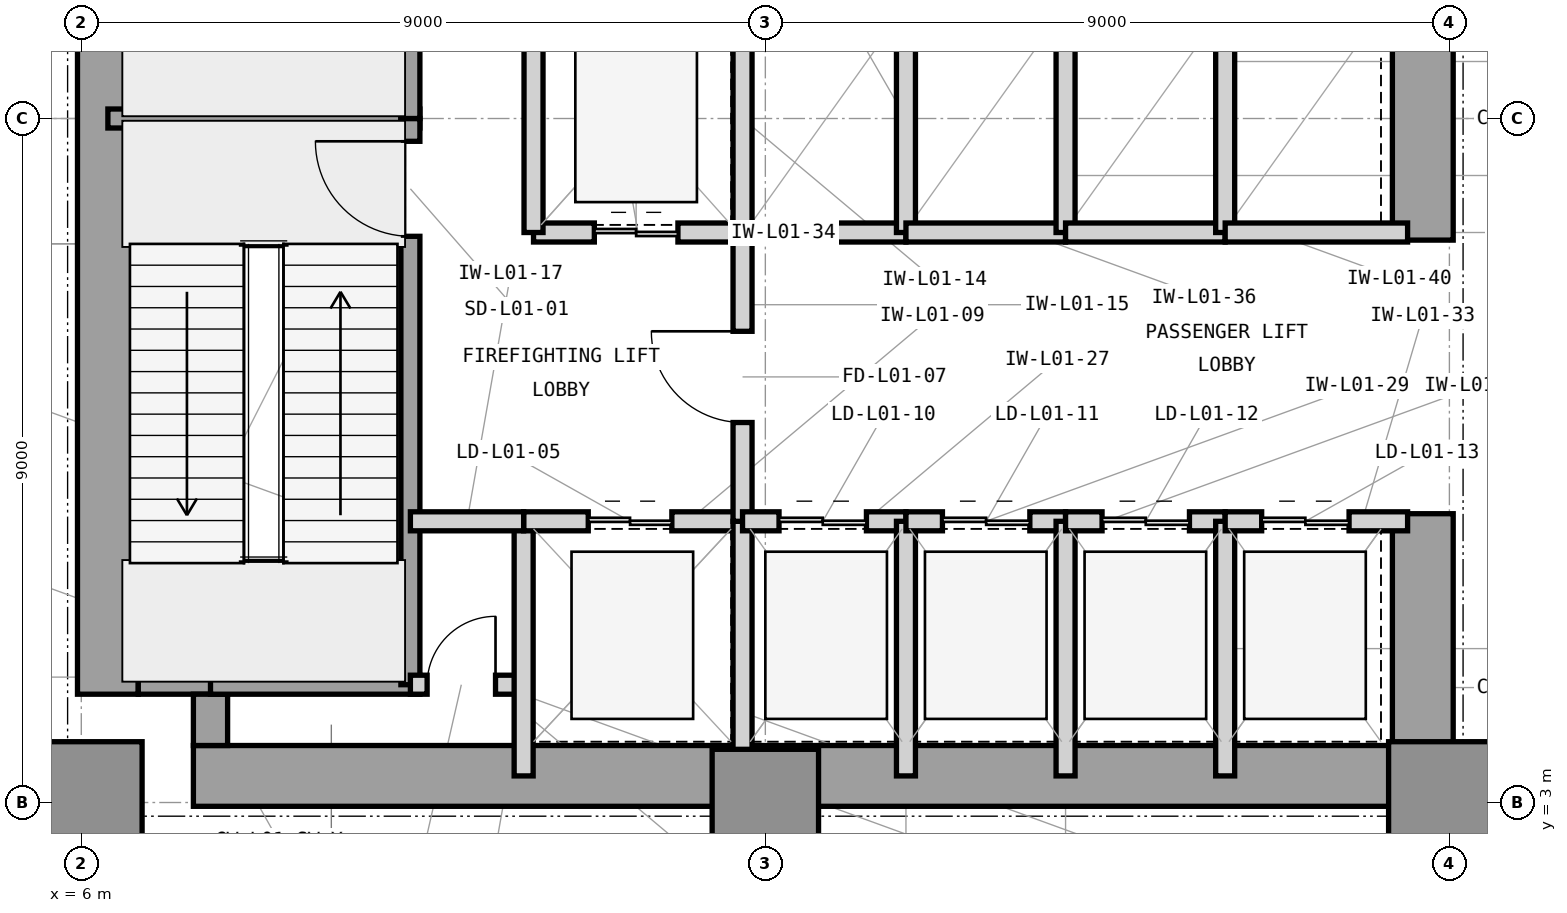
"""IFC4 building model, lengths in metres.
Left out: names, types, materials, properties, quantities, classifications, styles, units other than length and angle.
Written with IfcOpenShell. Run it as: python <this file> out.ifc"""

import sys

from ifc_helpers import new_model, si_unit, direction, frame, frame_2d, origin, origin_2d, place, context, subcontext, project, spatial, rectangle, extrude, element, fill, save


model = new_model("IFC4")
c1 = context("Model", 3, precision=1e-05, world=origin(), true_north=direction((0.0, 1.0)))
c2 = subcontext(c1, "Body", "Model", "MODEL_VIEW")
j1 = project(units=[si_unit("LENGTHUNIT", "METRE"), si_unit("PLANEANGLEUNIT", "RADIAN")], contexts=[c1])
p1 = place(None, origin())
s1 = spatial("IfcSite", under=j1, at=p1, CompositionType="ELEMENT")
p2 = place(p1, origin())
s2 = spatial("IfcBuilding", under=s1, at=p2, CompositionType="ELEMENT")
p3 = place(p2, frame((0.0, 0.0, 5.4)))
s3 = spatial("IfcBuildingStorey", under=s2, at=p3, CompositionType="ELEMENT", Elevation=5.4)
p4 = place(p3, frame((7.475, 3.35, 0.0), z_axis=(0.0, 0.0, 1.0), x_axis=(1.0, 0.0, 0.0)))
e1 = element("IfcWall", 1, at=p4, inside=s3, PredefinedType="SHEAR", context=c2, shape_type="SweptSolid", body=[
    extrude(rectangle(XDim=16.575, YDim=0.8, at=frame_2d((8.288, 0.0))), origin(), (0.0, 0.0, 1.0), 5.4),
])
p5 = place(p3, frame((6.35, 4.425, 0.0), z_axis=(0.0, 0.0, 1.0), x_axis=(0.0, 1.0, 0.0)))
e2 = element("IfcWall", 2, at=p5, inside=s3, PredefinedType="SHEAR", context=c2, shape_type="SweptSolid", body=[
    extrude(rectangle(XDim=15.15, YDim=0.8, at=frame_2d((7.575, 0.0))), origin(), (0.0, 0.0, 1.0), 5.4),
])
p6 = place(p3, frame((23.65, 3.75, 0.0), z_axis=(0.0, 0.0, 1.0), x_axis=(0.0, 1.0, 0.0)))
e3 = element("IfcWall", 3, at=p6, inside=s3, PredefinedType="SHEAR", context=c2, shape_type="SweptSolid", body=[
    extrude(rectangle(XDim=3.05, YDim=0.8, at=frame_2d((1.525, 0.0))), origin(), (0.0, 0.0, 1.0), 5.4),
])
p7 = place(p3, frame((23.65, 10.4, 0.0), z_axis=(0.0, 0.0, 1.0), x_axis=(0.0, 1.0, 0.0)))
e4 = element("IfcWall", 4, at=p7, inside=s3, PredefinedType="SHEAR", context=c2, shape_type="SweptSolid", body=[
    extrude(rectangle(XDim=3.2, YDim=0.8, at=frame_2d((1.6, 0.0))), origin(), (0.0, 0.0, 1.0), 5.4),
])
p8 = place(p3, frame((6.75, 4.65, 0.0), z_axis=(0.0, 0.0, 1.0), x_axis=(1.0, 0.0, 0.0)))
e5 = element("IfcWall", 5, at=p8, inside=s3, PredefinedType="SHEAR", context=c2, shape_type="SweptSolid", body=[
    extrude(rectangle(XDim=1.175, YDim=0.45, at=frame_2d((0.587, 0.0))), origin(), (0.0, 0.0, 1.0), 5.4),
])
p9 = place(p3, frame((7.7, 3.75, 0.0), z_axis=(0.0, 0.0, 1.0), x_axis=(0.0, 1.0, 0.0)))
e6 = element("IfcWall", 6, at=p9, inside=s3, PredefinedType="SHEAR", context=c2, shape_type="SweptSolid", body=[
    extrude(rectangle(XDim=0.675, YDim=0.45, at=frame_2d((0.337, 0.0))), origin(), (0.0, 0.0, 1.0), 5.4),
])
p10 = place(p3, frame((6.0, 3.0, 0.0), z_axis=(0.0, 0.0, 1.0), x_axis=(1.0, 0.0, 0.0)))
e7 = element("IfcColumn", 7, at=p10, inside=s3, PredefinedType="COLUMN", context=c2, shape_type="SweptSolid", body=[
    extrude(rectangle(XDim=1.6, YDim=1.6, at=origin_2d()), origin(), (0.0, 0.0, 1.0), 5.4),
])
p11 = place(p3, frame((15.0, 3.0, 0.0), z_axis=(0.0, 0.0, 1.0), x_axis=(1.0, 0.0, 0.0)))
e8 = element("IfcColumn", 8, at=p11, inside=s3, PredefinedType="COLUMN", context=c2, shape_type="SweptSolid", body=[
    extrude(rectangle(XDim=1.4, YDim=1.4, at=origin_2d()), origin(), (0.0, 0.0, 1.0), 5.4),
])
p12 = place(p3, frame((24.0, 3.0, 0.0), z_axis=(0.0, 0.0, 1.0), x_axis=(1.0, 0.0, 0.0)))
e9 = element("IfcColumn", 9, at=p12, inside=s3, PredefinedType="COLUMN", context=c2, shape_type="SweptSolid", body=[
    extrude(rectangle(XDim=1.6, YDim=1.6, at=origin_2d()), origin(), (0.0, 0.0, 1.0), 5.4),
])
p13 = place(p3, frame((6.35, 12.0, 0.0), z_axis=(0.0, 0.0, 1.0), x_axis=(1.0, 0.0, 0.0)))
e10 = element("IfcWall", 10, at=p13, inside=s3, PredefinedType="SHEAR", context=c2, shape_type="SweptSolid", body=[
    extrude(rectangle(XDim=4.105, YDim=0.25, at=frame_2d((2.052, 0.0))), origin(), (0.0, 0.0, 1.0), 5.4),
])
p14 = place(p3, frame((7.7, 4.55, 0.0), z_axis=(0.0, 0.0, 1.0), x_axis=(1.0, 0.0, 0.0)))
e11 = element("IfcWall", 11, at=p14, inside=s3, PredefinedType="SHEAR", context=c2, shape_type="SweptSolid", body=[
    extrude(rectangle(XDim=2.755, YDim=0.25, at=frame_2d((1.377, 0.0))), origin(), (0.0, 0.0, 1.0), 5.4),
])
p15 = place(p3, frame((10.33, 4.55, 0.0), z_axis=(0.0, 0.0, 1.0), x_axis=(0.0, 1.0, 0.0)))
e12 = element("IfcWall", 12, at=p15, inside=s3, PredefinedType="SHEAR", context=c2, shape_type="SweptSolid", body=[
    extrude(rectangle(XDim=7.45, YDim=0.25, at=frame_2d((3.725, 0.0))), origin(), (0.0, 0.0, 1.0), 5.4),
])
p16 = place(p15, frame((5.9, 0.0, 0.0)))
e13 = element("IfcOpeningElement", 13, at=p16, cuts=e12, PredefinedType="OPENING", context=c2, shape_type="SweptSolid", body=[
    extrude(rectangle(XDim=1.25, YDim=2.2, at=frame_2d((0.625, 1.1))), frame((0.0, 0.135, 0.0), z_axis=(0.0, -1.0, 0.0), x_axis=(1.0, 0.0, 0.0)), (0.0, 0.0, 1.0), 0.27),
])
p17 = place(p3, frame((10.33, 12.0, 0.0), z_axis=(0.0, 0.0, 1.0), x_axis=(0.0, 1.0, 0.0)))
e14 = element("IfcWall", 14, at=p17, inside=s3, PredefinedType="SHEAR", context=c2, shape_type="SweptSolid", body=[
    extrude(rectangle(XDim=7.45, YDim=0.25, at=frame_2d((3.725, 0.0))), origin(), (0.0, 0.0, 1.0), 5.4),
])
p18 = place(p17, frame((5.85, 0.0, 0.0)))
e15 = element("IfcOpeningElement", 15, at=p18, cuts=e14, PredefinedType="OPENING", context=c2, shape_type="SweptSolid", body=[
    extrude(rectangle(XDim=1.25, YDim=2.2, at=frame_2d((0.625, 1.1))), frame((0.0, 0.135, 0.0), z_axis=(0.0, -1.0, 0.0), x_axis=(1.0, 0.0, 0.0)), (0.0, 0.0, 1.0), 0.27),
])
p19 = place(p3, frame((10.33, 4.55, 0.0), z_axis=(0.0, 0.0, 1.0), x_axis=(1.0, 0.0, 0.0)))
e16 = element("IfcWall", 16, at=p19, inside=s3, PredefinedType="PARTITIONING", context=c2, shape_type="SweptSolid", body=[
    extrude(rectangle(XDim=1.49, YDim=0.25, at=frame_2d((0.745, 0.0))), origin(), (0.0, 0.0, 1.0), 5.09),
])
p20 = place(p19, frame((0.22, 0.0, 0.0)))
e17 = element("IfcOpeningElement", 17, at=p20, cuts=e16, PredefinedType="OPENING", context=c2, shape_type="SweptSolid", body=[
    extrude(rectangle(XDim=0.9, YDim=2.1, at=frame_2d((0.45, 1.05))), frame((0.0, 0.135, 0.0), z_axis=(0.0, -1.0, 0.0), x_axis=(1.0, 0.0, 0.0)), (0.0, 0.0, 1.0), 0.27),
])
p21 = place(p3, frame((11.82, 3.35, 0.0), z_axis=(0.0, 0.0, 1.0), x_axis=(0.0, 1.0, 0.0)))
e18 = element("IfcWall", 18, at=p21, inside=s3, PredefinedType="PARTITIONING", context=c2, shape_type="SweptSolid", body=[
    extrude(rectangle(XDim=3.35, YDim=0.25, at=frame_2d((1.675, 0.0))), origin(), (0.0, 0.0, 1.0), 5.09),
])
p22 = place(p3, frame((11.82, 6.7, 0.0), z_axis=(0.0, 0.0, 1.0), x_axis=(1.0, 0.0, 0.0)))
e19 = element("IfcWall", 19, at=p22, inside=s3, PredefinedType="PARTITIONING", context=c2, shape_type="SweptSolid", body=[
    extrude(rectangle(XDim=2.88, YDim=0.25, at=frame_2d((1.44, 0.0))), origin(), (0.0, 0.0, 1.0), 4.473),
])
p23 = place(p22, frame((0.85, 0.0, 0.0)))
e20 = element("IfcOpeningElement", 20, at=p23, cuts=e19, PredefinedType="OPENING", context=c2, shape_type="SweptSolid", body=[
    extrude(rectangle(XDim=1.1, YDim=2.25, at=frame_2d((0.55, 1.125))), frame((0.0, 0.135, 0.0), z_axis=(0.0, -1.0, 0.0), x_axis=(1.0, 0.0, 0.0)), (0.0, 0.0, 1.0), 0.27),
])
p24 = place(p3, frame((14.7, 3.35, 0.0), z_axis=(0.0, 0.0, 1.0), x_axis=(0.0, 1.0, 0.0)))
e21 = element("IfcWall", 21, at=p24, inside=s3, PredefinedType="PARTITIONING", context=c2, shape_type="SweptSolid", body=[
    extrude(rectangle(XDim=3.35, YDim=0.25, at=frame_2d((1.675, 0.0))), origin(), (0.0, 0.0, 1.0), 5.09),
])
p25 = place(p3, frame((11.95, 10.5, 0.0), z_axis=(0.0, 0.0, 1.0), x_axis=(1.0, 0.0, 0.0)))
e22 = element("IfcWall", 22, at=p25, inside=s3, PredefinedType="PARTITIONING", context=c2, shape_type="SweptSolid", body=[
    extrude(rectangle(XDim=2.75, YDim=0.25, at=frame_2d((1.375, 0.0))), origin(), (0.0, 0.0, 1.0), 4.473),
])
p26 = place(p25, frame((0.8, 0.0, 0.0)))
e23 = element("IfcOpeningElement", 23, at=p26, cuts=e22, PredefinedType="OPENING", context=c2, shape_type="SweptSolid", body=[
    extrude(rectangle(XDim=1.1, YDim=2.25, at=frame_2d((0.55, 1.125))), frame((0.0, 0.135, 0.0), z_axis=(0.0, -1.0, 0.0), x_axis=(1.0, 0.0, 0.0)), (0.0, 0.0, 1.0), 0.27),
])
for number, where, z_axis, x_axis in (
    (24, (11.95, 10.5, 0.0), (0.0, 0.0, 1.0), (0.0, 1.0, 0.0)),
    (25, (14.7, 10.5, 0.0), (0.0, 0.0, 1.0), (0.0, 1.0, 0.0)),
):
    element("IfcWall", number, at=place(p3, frame(where, z_axis=z_axis, x_axis=x_axis)), inside=s3, PredefinedType="PARTITIONING", context=c2, shape_type="SweptSolid", body=[
        extrude(rectangle(XDim=3.0, YDim=0.25, at=frame_2d((1.5, 0.0))), origin(), (0.0, 0.0, 1.0), 5.09),
    ])
p27 = place(p3, frame((14.7, 6.7, 0.0), z_axis=(0.0, 0.0, 1.0), x_axis=(0.0, 1.0, 0.0)))
e26 = element("IfcWall", 26, at=p27, inside=s3, PredefinedType="PARTITIONING", context=c2, shape_type="SweptSolid", body=[
    extrude(rectangle(XDim=3.8, YDim=0.25, at=frame_2d((1.9, 0.0))), origin(), (0.0, 0.0, 1.0), 5.09),
])
p28 = place(p27, frame((1.3, 0.0, 0.0)))
e27 = element("IfcOpeningElement", 27, at=p28, cuts=e26, PredefinedType="OPENING", context=c2, shape_type="SweptSolid", body=[
    extrude(rectangle(XDim=1.2, YDim=2.2, at=frame_2d((0.6, 1.1))), frame((0.0, 0.135, 0.0), z_axis=(0.0, -1.0, 0.0), x_axis=(1.0, 0.0, 0.0)), (0.0, 0.0, 1.0), 0.27),
])
p29 = place(p3, frame((10.33, 6.7, 0.0), z_axis=(0.0, 0.0, 1.0), x_axis=(1.0, 0.0, 0.0)))
e28 = element("IfcWall", 28, at=p29, inside=s3, PredefinedType="PARTITIONING", context=c2, shape_type="SweptSolid", body=[
    extrude(rectangle(XDim=1.49, YDim=0.25, at=frame_2d((0.745, 0.0))), origin(), (0.0, 0.0, 1.0), 4.473),
])
p30 = place(p3, frame((14.7, 6.7, 0.0), z_axis=(0.0, 0.0, 1.0), x_axis=(1.0, 0.0, 0.0)))
e29 = element("IfcWall", 29, at=p30, inside=s3, PredefinedType="PARTITIONING", context=c2, shape_type="SweptSolid", body=[
    extrude(rectangle(XDim=2.15, YDim=0.25, at=frame_2d((1.075, 0.0))), origin(), (0.0, 0.0, 1.0), 4.473),
])
p31 = place(p30, frame((0.48, 0.0, 0.0)))
e30 = element("IfcOpeningElement", 30, at=p31, cuts=e29, PredefinedType="OPENING", context=c2, shape_type="SweptSolid", body=[
    extrude(rectangle(XDim=1.15, YDim=2.25, at=frame_2d((0.575, 1.125))), frame((0.0, 0.135, 0.0), z_axis=(0.0, -1.0, 0.0), x_axis=(1.0, 0.0, 0.0)), (0.0, 0.0, 1.0), 0.27),
])
p32 = place(p3, frame((16.85, 3.35, 0.0), z_axis=(0.0, 0.0, 1.0), x_axis=(0.0, 1.0, 0.0)))
e31 = element("IfcWall", 31, at=p32, inside=s3, PredefinedType="PARTITIONING", context=c2, shape_type="SweptSolid", body=[
    extrude(rectangle(XDim=3.35, YDim=0.25, at=frame_2d((1.675, 0.0))), origin(), (0.0, 0.0, 1.0), 5.09),
])
p33 = place(p3, frame((16.85, 6.7, 0.0), z_axis=(0.0, 0.0, 1.0), x_axis=(1.0, 0.0, 0.0)))
e32 = element("IfcWall", 32, at=p33, inside=s3, PredefinedType="PARTITIONING", context=c2, shape_type="SweptSolid", body=[
    extrude(rectangle(XDim=2.1, YDim=0.25, at=frame_2d((1.05, 0.0))), origin(), (0.0, 0.0, 1.0), 4.473),
])
p34 = place(p33, frame((0.48, 0.0, 0.0)))
e33 = element("IfcOpeningElement", 33, at=p34, cuts=e32, PredefinedType="OPENING", context=c2, shape_type="SweptSolid", body=[
    extrude(rectangle(XDim=1.15, YDim=2.25, at=frame_2d((0.575, 1.125))), frame((0.0, 0.135, 0.0), z_axis=(0.0, -1.0, 0.0), x_axis=(1.0, 0.0, 0.0)), (0.0, 0.0, 1.0), 0.27),
])
p35 = place(p3, frame((18.95, 3.35, 0.0), z_axis=(0.0, 0.0, 1.0), x_axis=(0.0, 1.0, 0.0)))
e34 = element("IfcWall", 34, at=p35, inside=s3, PredefinedType="PARTITIONING", context=c2, shape_type="SweptSolid", body=[
    extrude(rectangle(XDim=3.35, YDim=0.25, at=frame_2d((1.675, 0.0))), origin(), (0.0, 0.0, 1.0), 5.09),
])
p36 = place(p3, frame((18.95, 6.7, 0.0), z_axis=(0.0, 0.0, 1.0), x_axis=(1.0, 0.0, 0.0)))
e35 = element("IfcWall", 35, at=p36, inside=s3, PredefinedType="PARTITIONING", context=c2, shape_type="SweptSolid", body=[
    extrude(rectangle(XDim=2.1, YDim=0.25, at=frame_2d((1.05, 0.0))), origin(), (0.0, 0.0, 1.0), 4.473),
])
p37 = place(p36, frame((0.48, 0.0, 0.0)))
e36 = element("IfcOpeningElement", 36, at=p37, cuts=e35, PredefinedType="OPENING", context=c2, shape_type="SweptSolid", body=[
    extrude(rectangle(XDim=1.15, YDim=2.25, at=frame_2d((0.575, 1.125))), frame((0.0, 0.135, 0.0), z_axis=(0.0, -1.0, 0.0), x_axis=(1.0, 0.0, 0.0)), (0.0, 0.0, 1.0), 0.27),
])
p38 = place(p3, frame((21.05, 3.35, 0.0), z_axis=(0.0, 0.0, 1.0), x_axis=(0.0, 1.0, 0.0)))
e37 = element("IfcWall", 37, at=p38, inside=s3, PredefinedType="PARTITIONING", context=c2, shape_type="SweptSolid", body=[
    extrude(rectangle(XDim=3.35, YDim=0.25, at=frame_2d((1.675, 0.0))), origin(), (0.0, 0.0, 1.0), 5.09),
])
p39 = place(p3, frame((21.05, 6.7, 0.0), z_axis=(0.0, 0.0, 1.0), x_axis=(1.0, 0.0, 0.0)))
e38 = element("IfcWall", 38, at=p39, inside=s3, PredefinedType="PARTITIONING", context=c2, shape_type="SweptSolid", body=[
    extrude(rectangle(XDim=2.4, YDim=0.25, at=frame_2d((1.2, 0.0))), origin(), (0.0, 0.0, 1.0), 4.473),
])
p40 = place(p39, frame((0.48, 0.0, 0.0)))
e39 = element("IfcOpeningElement", 39, at=p40, cuts=e38, PredefinedType="OPENING", context=c2, shape_type="SweptSolid", body=[
    extrude(rectangle(XDim=1.15, YDim=2.25, at=frame_2d((0.575, 1.125))), frame((0.0, 0.135, 0.0), z_axis=(0.0, -1.0, 0.0), x_axis=(1.0, 0.0, 0.0)), (0.0, 0.0, 1.0), 0.27),
])
p41 = place(p3, frame((14.7, 10.5, 0.0), z_axis=(0.0, 0.0, 1.0), x_axis=(1.0, 0.0, 0.0)))
e40 = element("IfcWall", 40, at=p41, inside=s3, PredefinedType="PARTITIONING", context=c2, shape_type="SweptSolid", body=[
    extrude(rectangle(XDim=2.15, YDim=0.25, at=frame_2d((1.075, 0.0))), origin(), (0.0, 0.0, 1.0), 4.473),
])
p42 = place(p3, frame((16.85, 10.5, 0.0), z_axis=(0.0, 0.0, 1.0), x_axis=(0.0, 1.0, 0.0)))
e41 = element("IfcWall", 41, at=p42, inside=s3, PredefinedType="PARTITIONING", context=c2, shape_type="SweptSolid", body=[
    extrude(rectangle(XDim=3.0, YDim=0.25, at=frame_2d((1.5, 0.0))), origin(), (0.0, 0.0, 1.0), 5.09),
])
p43 = place(p3, frame((16.85, 10.5, 0.0), z_axis=(0.0, 0.0, 1.0), x_axis=(1.0, 0.0, 0.0)))
e42 = element("IfcWall", 42, at=p43, inside=s3, PredefinedType="PARTITIONING", context=c2, shape_type="SweptSolid", body=[
    extrude(rectangle(XDim=2.1, YDim=0.25, at=frame_2d((1.05, 0.0))), origin(), (0.0, 0.0, 1.0), 4.473),
])
p44 = place(p3, frame((18.95, 10.5, 0.0), z_axis=(0.0, 0.0, 1.0), x_axis=(0.0, 1.0, 0.0)))
e43 = element("IfcWall", 43, at=p44, inside=s3, PredefinedType="PARTITIONING", context=c2, shape_type="SweptSolid", body=[
    extrude(rectangle(XDim=3.0, YDim=0.25, at=frame_2d((1.5, 0.0))), origin(), (0.0, 0.0, 1.0), 5.09),
])
p45 = place(p3, frame((18.95, 10.5, 0.0), z_axis=(0.0, 0.0, 1.0), x_axis=(1.0, 0.0, 0.0)))
e44 = element("IfcWall", 44, at=p45, inside=s3, PredefinedType="PARTITIONING", context=c2, shape_type="SweptSolid", body=[
    extrude(rectangle(XDim=2.1, YDim=0.25, at=frame_2d((1.05, 0.0))), origin(), (0.0, 0.0, 1.0), 4.473),
])
p46 = place(p3, frame((21.05, 10.5, 0.0), z_axis=(0.0, 0.0, 1.0), x_axis=(0.0, 1.0, 0.0)))
e45 = element("IfcWall", 45, at=p46, inside=s3, PredefinedType="PARTITIONING", context=c2, shape_type="SweptSolid", body=[
    extrude(rectangle(XDim=3.0, YDim=0.25, at=frame_2d((1.5, 0.0))), origin(), (0.0, 0.0, 1.0), 5.09),
])
p47 = place(p3, frame((21.05, 10.5, 0.0), z_axis=(0.0, 0.0, 1.0), x_axis=(1.0, 0.0, 0.0)))
e46 = element("IfcWall", 46, at=p47, inside=s3, PredefinedType="PARTITIONING", context=c2, shape_type="SweptSolid", body=[
    extrude(rectangle(XDim=2.4, YDim=0.25, at=frame_2d((1.2, 0.0))), origin(), (0.0, 0.0, 1.0), 4.473),
])
p48 = place(p3, frame((6.25, 0.21, 0.0), z_axis=(0.0, 0.0, 1.0), x_axis=(0.0, 1.0, 0.0)))
e47 = element("IfcWall", 47, at=p48, inside=s3, PredefinedType="PARTITIONING", context=c2, shape_type="SweptSolid", body=[
    extrude(rectangle(XDim=3.14, YDim=0.2, at=frame_2d((1.57, 0.0))), origin(), (0.0, 0.0, 1.0), 5.09),
])
p49 = place(p48, frame((0.42, 0.0, 0.0)))
e48 = element("IfcOpeningElement", 48, at=p49, cuts=e47, PredefinedType="OPENING", context=c2, shape_type="SweptSolid", body=[
    extrude(rectangle(XDim=1.0, YDim=2.15, at=frame_2d((0.5, 1.075))), frame((0.0, 0.11, 0.0), z_axis=(0.0, -1.0, 0.0), x_axis=(1.0, 0.0, 0.0)), (0.0, 0.0, 1.0), 0.22),
])
p50 = place(p16, origin())
e49 = element("IfcDoor", 49, at=p50, inside=s3, OperationType="SINGLE_SWING_RIGHT", PredefinedType="DOOR", context=c2, shape_type="SweptSolid", body=[
    extrude(rectangle(XDim=1.25, YDim=2.2, at=frame_2d((0.625, 1.1))), frame((0.0, 0.025, 0.0), z_axis=(0.0, -1.0, 0.0), x_axis=(1.0, 0.0, 0.0)), (0.0, 0.0, 1.0), 0.05),
])
fill(e13, e49)
p51 = place(p20, origin())
e50 = element("IfcDoor", 50, at=p51, inside=s3, OperationType="SINGLE_SWING_RIGHT", PredefinedType="TRAPDOOR", context=c2, shape_type="SweptSolid", body=[
    extrude(rectangle(XDim=0.9, YDim=2.1, at=frame_2d((0.45, 1.05))), frame((0.0, 0.025, 0.0), z_axis=(0.0, -1.0, 0.0), x_axis=(1.0, 0.0, 0.0)), (0.0, 0.0, 1.0), 0.05),
])
fill(e17, e50)
p52 = place(p23, origin())
e51 = element("IfcDoor", 51, at=p52, inside=s3, OperationType="DOUBLE_DOOR_SLIDING", PredefinedType="DOOR", context=c2, shape_type="SweptSolid", body=[
    extrude(rectangle(XDim=1.1, YDim=2.25, at=frame_2d((0.55, 1.125))), frame((0.0, 0.025, 0.0), z_axis=(0.0, -1.0, 0.0), x_axis=(1.0, 0.0, 0.0)), (0.0, 0.0, 1.0), 0.05),
])
fill(e20, e51)
p53 = place(p26, origin())
e52 = element("IfcDoor", 52, at=p53, inside=s3, OperationType="DOUBLE_DOOR_SLIDING", PredefinedType="DOOR", context=c2, shape_type="SweptSolid", body=[
    extrude(rectangle(XDim=1.1, YDim=2.25, at=frame_2d((0.55, 1.125))), frame((0.0, 0.025, 0.0), z_axis=(0.0, -1.0, 0.0), x_axis=(1.0, 0.0, 0.0)), (0.0, 0.0, 1.0), 0.05),
])
fill(e23, e52)
p54 = place(p28, origin())
e53 = element("IfcDoor", 53, at=p54, inside=s3, OperationType="SINGLE_SWING_RIGHT", PredefinedType="DOOR", context=c2, shape_type="SweptSolid", body=[
    extrude(rectangle(XDim=1.2, YDim=2.2, at=frame_2d((0.6, 1.1))), frame((0.0, 0.025, 0.0), z_axis=(0.0, -1.0, 0.0), x_axis=(1.0, 0.0, 0.0)), (0.0, 0.0, 1.0), 0.05),
])
fill(e27, e53)
p55 = place(p31, origin())
e54 = element("IfcDoor", 54, at=p55, inside=s3, OperationType="DOUBLE_DOOR_SLIDING", PredefinedType="DOOR", context=c2, shape_type="SweptSolid", body=[
    extrude(rectangle(XDim=1.15, YDim=2.25, at=frame_2d((0.575, 1.125))), frame((0.0, 0.025, 0.0), z_axis=(0.0, -1.0, 0.0), x_axis=(1.0, 0.0, 0.0)), (0.0, 0.0, 1.0), 0.05),
])
fill(e30, e54)
p56 = place(p34, origin())
e55 = element("IfcDoor", 55, at=p56, inside=s3, OperationType="DOUBLE_DOOR_SLIDING", PredefinedType="DOOR", context=c2, shape_type="SweptSolid", body=[
    extrude(rectangle(XDim=1.15, YDim=2.25, at=frame_2d((0.575, 1.125))), frame((0.0, 0.025, 0.0), z_axis=(0.0, -1.0, 0.0), x_axis=(1.0, 0.0, 0.0)), (0.0, 0.0, 1.0), 0.05),
])
fill(e33, e55)
p57 = place(p37, origin())
e56 = element("IfcDoor", 56, at=p57, inside=s3, OperationType="DOUBLE_DOOR_SLIDING", PredefinedType="DOOR", context=c2, shape_type="SweptSolid", body=[
    extrude(rectangle(XDim=1.15, YDim=2.25, at=frame_2d((0.575, 1.125))), frame((0.0, 0.025, 0.0), z_axis=(0.0, -1.0, 0.0), x_axis=(1.0, 0.0, 0.0)), (0.0, 0.0, 1.0), 0.05),
])
fill(e36, e56)
p58 = place(p40, origin())
e57 = element("IfcDoor", 57, at=p58, inside=s3, OperationType="DOUBLE_DOOR_SLIDING", PredefinedType="DOOR", context=c2, shape_type="SweptSolid", body=[
    extrude(rectangle(XDim=1.15, YDim=2.25, at=frame_2d((0.575, 1.125))), frame((0.0, 0.025, 0.0), z_axis=(0.0, -1.0, 0.0), x_axis=(1.0, 0.0, 0.0)), (0.0, 0.0, 1.0), 0.05),
])
fill(e39, e57)
save(model, sys.argv[1])
